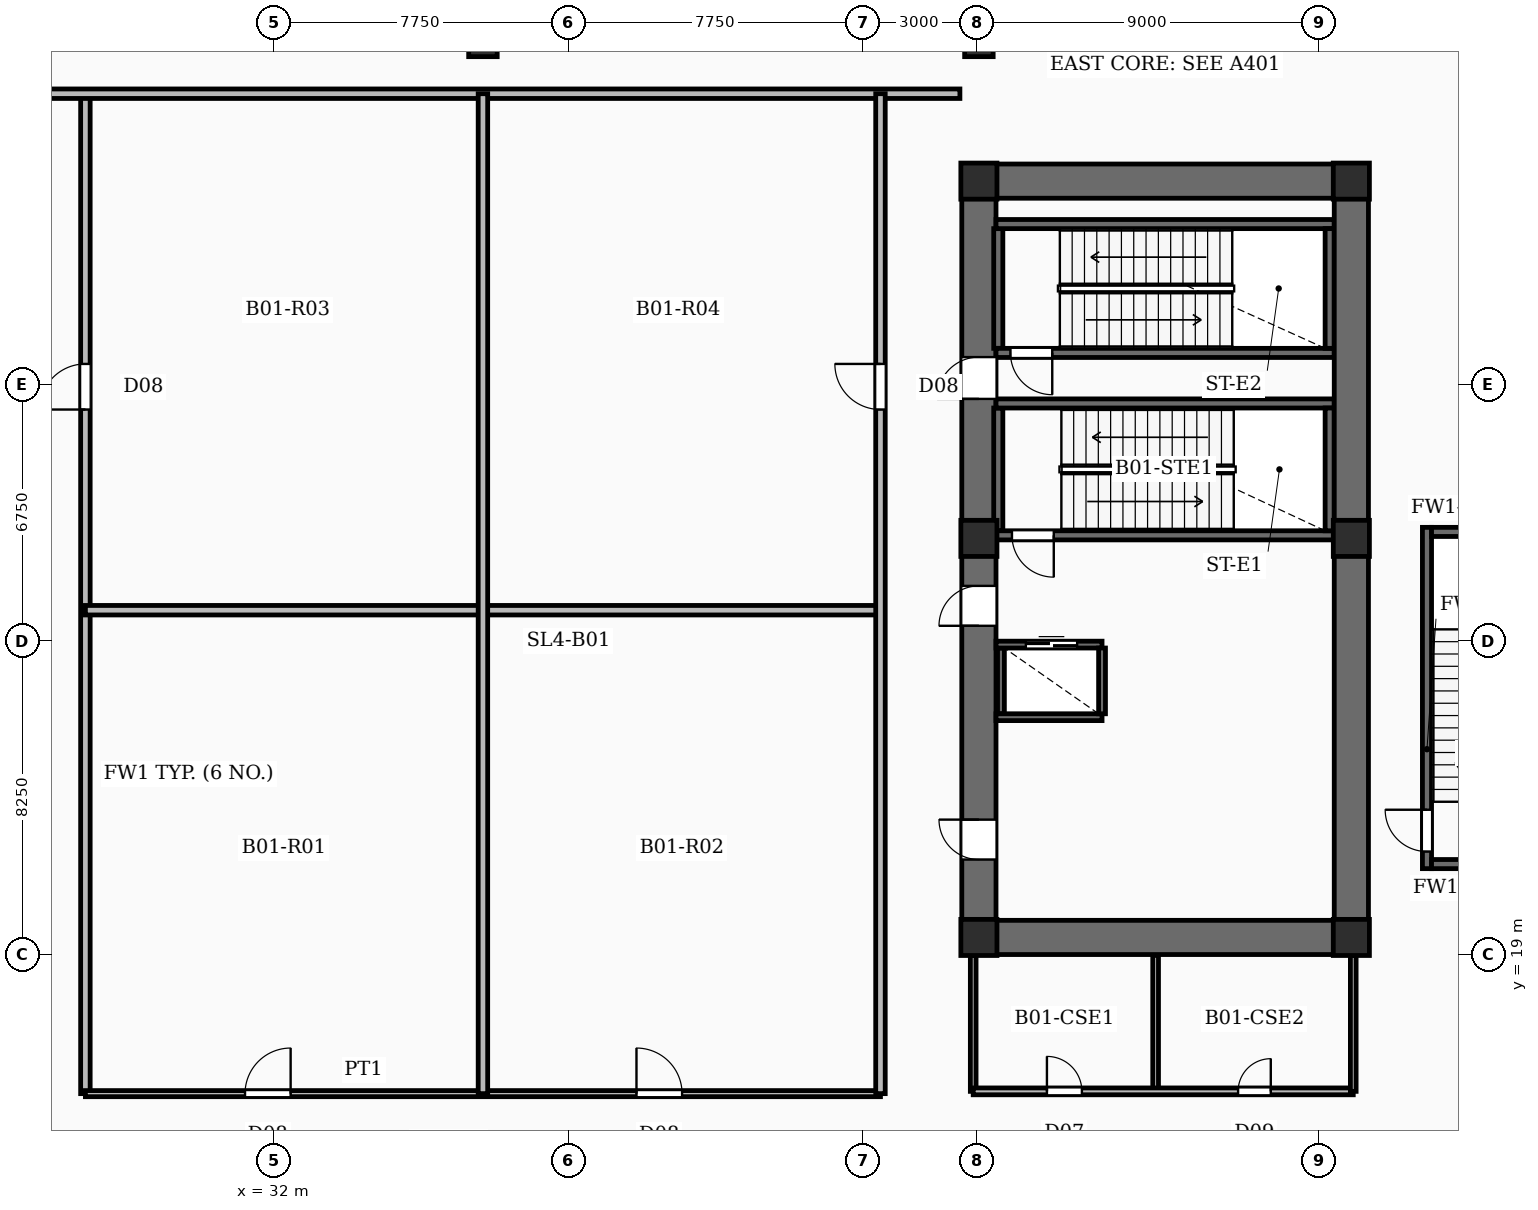
"""IFC4 building model, lengths in metres.
Left out: names, types, materials, properties, quantities, classifications, styles, units other than length and angle.
Written with IfcOpenShell. Run it as: python <this file> out.ifc"""

import sys

from ifc_helpers import new_model, si_unit, direction, frame, frame_2d, origin, origin_2d, place, context, subcontext, project, spatial, rectangle, extrude, element, fill, save


model = new_model("IFC4")
c1 = context("Model", 3, precision=1e-05, world=origin(), true_north=direction((0.0, 1.0)))
c2 = subcontext(c1, "Body", "Model", "MODEL_VIEW")
j1 = project(units=[si_unit("LENGTHUNIT", "METRE"), si_unit("PLANEANGLEUNIT", "RADIAN")], contexts=[c1])
p1 = place(None, origin())
s1 = spatial("IfcSite", under=j1, at=p1, CompositionType="ELEMENT")
p2 = place(p1, origin())
s2 = spatial("IfcBuilding", under=s1, at=p2, CompositionType="ELEMENT")
p3 = place(p2, frame((0.0, 0.0, -5.0)))
s3 = spatial("IfcBuildingStorey", under=s2, at=p3, CompositionType="ELEMENT", Elevation=-5.0)
p4 = place(p3, frame((50.55, 19.0, -0.31), z_axis=(0.0, 0.0, 1.0), x_axis=(0.0, 1.0, 0.0)))
e1 = element("IfcWall", 1, at=p4, inside=s3, PredefinedType="SHEAR", context=c2, shape_type="SweptSolid", body=[
    extrude(rectangle(XDim=20.8, YDim=0.9, at=frame_2d((10.4, 0.0))), origin(), (0.0, 0.0, 1.0), 4.86),
])
p5 = place(p4, frame((2.5, 0.0, 0.31)))
e2 = element("IfcOpeningElement", 2, at=p5, cuts=e1, PredefinedType="OPENING", context=c2, shape_type="SweptSolid", body=[
    extrude(rectangle(XDim=1.05, YDim=2.15, at=frame_2d((0.525, 1.075))), frame((0.0, 0.46, 0.0), z_axis=(0.0, -1.0, 0.0), x_axis=(1.0, 0.0, 0.0)), (0.0, 0.0, 1.0), 0.92),
])
p6 = place(p4, frame((8.65, 0.0, 0.31)))
e3 = element("IfcOpeningElement", 3, at=p6, cuts=e1, PredefinedType="OPENING", context=c2, shape_type="SweptSolid", body=[
    extrude(rectangle(XDim=1.05, YDim=2.15, at=frame_2d((0.525, 1.075))), frame((0.0, 0.46, 0.0), z_axis=(0.0, -1.0, 0.0), x_axis=(1.0, 0.0, 0.0)), (0.0, 0.0, 1.0), 0.92),
])
p7 = place(p4, frame((14.62, 0.0, 0.31)))
e4 = element("IfcOpeningElement", 4, at=p7, cuts=e1, PredefinedType="OPENING", context=c2, shape_type="SweptSolid", body=[
    extrude(rectangle(XDim=1.1, YDim=2.15, at=frame_2d((0.55, 1.075))), frame((0.0, 0.46, 0.0), z_axis=(0.0, -1.0, 0.0), x_axis=(1.0, 0.0, 0.0)), (0.0, 0.0, 1.0), 0.92),
])
p8 = place(p3, frame((60.35, 19.0, -0.31), z_axis=(0.0, 0.0, 1.0), x_axis=(0.0, 1.0, 0.0)))
e5 = element("IfcWall", 5, at=p8, inside=s3, PredefinedType="SHEAR", context=c2, shape_type="SweptSolid", body=[
    extrude(rectangle(XDim=20.8, YDim=0.9, at=frame_2d((10.4, 0.0))), origin(), (0.0, 0.0, 1.0), 4.86),
])
for number, where, z_axis, x_axis in (
    (6, (51.0, 19.45, -0.31), (0.0, 0.0, 1.0), (1.0, 0.0, 0.0)),
    (7, (51.0, 39.35, -0.31), (0.0, 0.0, 1.0), (1.0, 0.0, 0.0)),
):
    element("IfcWall", number, at=place(p3, frame(where, z_axis=z_axis, x_axis=x_axis)), inside=s3, PredefinedType="SHEAR", context=c2, shape_type="SweptSolid", body=[
        extrude(rectangle(XDim=8.9, YDim=0.9, at=frame_2d((4.45, 0.0))), origin(), (0.0, 0.0, 1.0), 4.86),
    ])
for number, where, z_axis, x_axis in (
    (8, (50.55, 19.45, -0.31), (0.0, 0.0, 1.0), (1.0, 0.0, 0.0)),
    (9, (60.35, 19.45, -0.31), (0.0, 0.0, 1.0), (1.0, 0.0, 0.0)),
    (10, (50.55, 29.95, -0.31), (0.0, 0.0, 1.0), (1.0, 0.0, 0.0)),
    (11, (60.35, 29.95, -0.31), (0.0, 0.0, 1.0), (1.0, 0.0, 0.0)),
    (12, (50.55, 39.35, -0.31), (0.0, 0.0, 1.0), (1.0, 0.0, 0.0)),
    (13, (60.35, 39.35, -0.31), (0.0, 0.0, 1.0), (1.0, 0.0, 0.0)),
):
    element("IfcColumn", number, at=place(p3, frame(where, z_axis=z_axis, x_axis=x_axis)), inside=s3, PredefinedType="COLUMN", context=c2, shape_type="SweptSolid", body=[
        extrude(rectangle(XDim=0.95, YDim=0.95, at=origin_2d()), origin(), (0.0, 0.0, 1.0), 4.86),
    ])
for number, where, z_axis, x_axis in (
    (14, (37.5, 43.0, -0.31), (0.0, 0.0, 1.0), (1.0, 0.0, 0.0)),
    (15, (50.55, 43.0, -0.31), (0.0, 0.0, 1.0), (1.0, 0.0, 0.0)),
):
    element("IfcColumn", number, at=place(p3, frame(where, z_axis=z_axis, x_axis=x_axis)), inside=s3, PredefinedType="COLUMN", context=c2, shape_type="SweptSolid", body=[
        extrude(rectangle(XDim=0.75, YDim=0.75, at=origin_2d()), origin(), (0.0, 0.0, 1.0), 4.86),
    ])
p9 = place(p3, frame((62.34, 21.26, 0.0), z_axis=(0.0, 0.0, 1.0), x_axis=(0.0, 1.0, 0.0)))
e16 = element("IfcWall", 16, at=p9, inside=s3, PredefinedType="SOLIDWALL", context=c2, shape_type="SweptSolid", body=[
    extrude(rectangle(XDim=8.98, YDim=0.24, at=frame_2d((4.49, 0.0))), origin(), (0.0, 0.0, 1.0), 4.55),
])
p10 = place(p9, frame((0.45, 0.0, 0.0)))
e17 = element("IfcOpeningElement", 17, at=p10, cuts=e16, PredefinedType="OPENING", context=c2, shape_type="SweptSolid", body=[
    extrude(rectangle(XDim=1.1, YDim=2.15, at=frame_2d((0.55, 1.075))), frame((0.0, 0.13, 0.0), z_axis=(0.0, -1.0, 0.0), x_axis=(1.0, 0.0, 0.0)), (0.0, 0.0, 1.0), 0.26),
])
for number, where, z_axis, x_axis in (
    (18, (62.46, 21.38, 0.0), (0.0, 0.0, 1.0), (1.0, 0.0, 0.0)),
    (19, (62.46, 30.12, 0.0), (0.0, 0.0, 1.0), (1.0, 0.0, 0.0)),
):
    element("IfcWall", number, at=place(p3, frame(where, z_axis=z_axis, x_axis=x_axis)), inside=s3, PredefinedType="SOLIDWALL", context=c2, shape_type="SweptSolid", body=[
        extrude(rectangle(XDim=3.19, YDim=0.24, at=frame_2d((1.595, 0.0))), origin(), (0.0, 0.0, 1.0), 4.55),
    ])
p11 = place(p3, frame((59.9, 30.03, 0.0), z_axis=(0.0, 0.0, 1.0), x_axis=(-1.0, 0.0, 0.0)))
e20 = element("IfcWall", 20, at=p11, inside=s3, PredefinedType="SOLIDWALL", context=c2, shape_type="SweptSolid", body=[
    extrude(rectangle(XDim=8.9, YDim=0.24, at=frame_2d((4.45, 0.0))), origin(), (0.0, 0.0, 1.0), 4.55),
])
p12 = place(p11, frame((7.38, 0.0, 0.0)))
e21 = element("IfcOpeningElement", 21, at=p12, cuts=e20, PredefinedType="OPENING", context=c2, shape_type="SweptSolid", body=[
    extrude(rectangle(XDim=1.1, YDim=2.15, at=frame_2d((0.55, 1.075))), frame((0.0, 0.13, 0.0), z_axis=(0.0, -1.0, 0.0), x_axis=(1.0, 0.0, 0.0)), (0.0, 0.0, 1.0), 0.26),
])
p13 = place(p3, frame((51.0, 33.5, 0.0), z_axis=(0.0, 0.0, 1.0), x_axis=(1.0, 0.0, 0.0)))
e22 = element("IfcWall", 22, at=p13, inside=s3, PredefinedType="SOLIDWALL", context=c2, shape_type="SweptSolid", body=[
    extrude(rectangle(XDim=8.9, YDim=0.24, at=frame_2d((4.45, 0.0))), origin(), (0.0, 0.0, 1.0), 4.55),
])
for number, where, z_axis, x_axis in (
    (23, (51.06, 30.15, 0.0), (0.0, 0.0, 1.0), (0.0, 1.0, 0.0)),
    (24, (59.78, 30.15, 0.0), (0.0, 0.0, 1.0), (0.0, 1.0, 0.0)),
):
    element("IfcWall", number, at=place(p3, frame(where, z_axis=z_axis, x_axis=x_axis)), inside=s3, PredefinedType="SOLIDWALL", context=c2, shape_type="SweptSolid", body=[
        extrude(rectangle(XDim=3.23, YDim=0.24, at=frame_2d((1.615, 0.0))), origin(), (0.0, 0.0, 1.0), 4.55),
    ])
p14 = place(p3, frame((59.9, 34.83, 0.0), z_axis=(0.0, 0.0, 1.0), x_axis=(-1.0, 0.0, 0.0)))
e25 = element("IfcWall", 25, at=p14, inside=s3, PredefinedType="SOLIDWALL", context=c2, shape_type="SweptSolid", body=[
    extrude(rectangle(XDim=8.9, YDim=0.24, at=frame_2d((4.45, 0.0))), origin(), (0.0, 0.0, 1.0), 4.55),
])
p15 = place(p14, frame((7.42, 0.0, 0.0)))
e26 = element("IfcOpeningElement", 26, at=p15, cuts=e25, PredefinedType="OPENING", context=c2, shape_type="SweptSolid", body=[
    extrude(rectangle(XDim=1.1, YDim=2.15, at=frame_2d((0.55, 1.075))), frame((0.0, 0.13, 0.0), z_axis=(0.0, -1.0, 0.0), x_axis=(1.0, 0.0, 0.0)), (0.0, 0.0, 1.0), 0.26),
])
p16 = place(p3, frame((51.0, 38.22, 0.0), z_axis=(0.0, 0.0, 1.0), x_axis=(1.0, 0.0, 0.0)))
e27 = element("IfcWall", 27, at=p16, inside=s3, PredefinedType="SOLIDWALL", context=c2, shape_type="SweptSolid", body=[
    extrude(rectangle(XDim=8.9, YDim=0.24, at=frame_2d((4.45, 0.0))), origin(), (0.0, 0.0, 1.0), 4.55),
])
for number, where, z_axis, x_axis in (
    (28, (51.06, 34.95, 0.0), (0.0, 0.0, 1.0), (0.0, 1.0, 0.0)),
    (29, (59.78, 34.95, 0.0), (0.0, 0.0, 1.0), (0.0, 1.0, 0.0)),
):
    element("IfcWall", number, at=place(p3, frame(where, z_axis=z_axis, x_axis=x_axis)), inside=s3, PredefinedType="SOLIDWALL", context=c2, shape_type="SweptSolid", body=[
        extrude(rectangle(XDim=3.15, YDim=0.24, at=frame_2d((1.575, 0.0))), origin(), (0.0, 0.0, 1.0), 4.55),
    ])
p17 = place(p3, frame((51.0, 27.155, 0.0), z_axis=(0.0, 0.0, 1.0), x_axis=(1.0, 0.0, 0.0)))
e30 = element("IfcWall", 30, at=p17, inside=s3, PredefinedType="SOLIDWALL", context=c2, shape_type="SweptSolid", body=[
    extrude(rectangle(XDim=2.79, YDim=0.18, at=frame_2d((1.395, 0.0))), origin(), (0.0, 0.0, 1.0), 4.55),
])
p18 = place(p17, frame((0.785, 0.0, 0.0)))
e31 = element("IfcOpeningElement", 31, at=p18, cuts=e30, PredefinedType="OPENING", context=c2, shape_type="SweptSolid", body=[
    extrude(rectangle(XDim=1.35, YDim=2.3, at=frame_2d((0.675, 1.15))), frame((0.0, 0.1, 0.0), z_axis=(0.0, -1.0, 0.0), x_axis=(1.0, 0.0, 0.0)), (0.0, 0.0, 1.0), 0.2),
])
p19 = place(p3, frame((51.0, 25.245, 0.0), z_axis=(0.0, 0.0, 1.0), x_axis=(1.0, 0.0, 0.0)))
e32 = element("IfcWall", 32, at=p19, inside=s3, PredefinedType="SOLIDWALL", context=c2, shape_type="SweptSolid", body=[
    extrude(rectangle(XDim=2.79, YDim=0.18, at=frame_2d((1.395, 0.0))), origin(), (0.0, 0.0, 1.0), 4.55),
])
for number, where, z_axis, x_axis in (
    (33, (51.13, 25.335, 0.0), (0.0, 0.0, 1.0), (0.0, 1.0, 0.0)),
    (34, (53.79, 25.335, 0.0), (0.0, 0.0, 1.0), (0.0, 1.0, 0.0)),
):
    element("IfcWall", number, at=place(p3, frame(where, z_axis=z_axis, x_axis=x_axis)), inside=s3, PredefinedType="SOLIDWALL", context=c2, shape_type="SweptSolid", body=[
        extrude(rectangle(XDim=1.73, YDim=0.18, at=frame_2d((0.865, 0.0))), origin(), (0.0, 0.0, 1.0), 4.55),
    ])
p20 = place(p3, frame((55.2, 15.4, 0.0), z_axis=(0.0, 0.0, 1.0), x_axis=(0.0, 1.0, 0.0)))
e35 = element("IfcWall", 35, at=p20, inside=s3, PredefinedType="PARTITIONING", context=c2, shape_type="SweptSolid", body=[
    extrude(rectangle(XDim=3.58, YDim=0.15, at=frame_2d((1.79, 0.0))), origin(), (0.0, 0.0, 1.0), 3.61),
])
p21 = place(p3, frame((50.4, 15.4, 0.0), z_axis=(0.0, 0.0, 1.0), x_axis=(1.0, 0.0, 0.0)))
e36 = element("IfcWall", 36, at=p21, inside=s3, PredefinedType="SOLIDWALL", context=c2, shape_type="SweptSolid", body=[
    extrude(rectangle(XDim=10.0, YDim=0.18, at=frame_2d((5.0, 0.0))), origin(), (0.0, 0.0, 1.0), 3.61),
])
p22 = place(p21, frame((1.94, 0.0, 0.0)))
e37 = element("IfcOpeningElement", 37, at=p22, cuts=e36, PredefinedType="OPENING", context=c2, shape_type="SweptSolid", body=[
    extrude(rectangle(XDim=0.92, YDim=2.1, at=frame_2d((0.46, 1.05))), frame((0.0, 0.1, 0.0), z_axis=(0.0, -1.0, 0.0), x_axis=(1.0, 0.0, 0.0)), (0.0, 0.0, 1.0), 0.2),
])
p23 = place(p21, frame((6.97, 0.0, 0.0)))
e38 = element("IfcOpeningElement", 38, at=p23, cuts=e36, PredefinedType="OPENING", context=c2, shape_type="SweptSolid", body=[
    extrude(rectangle(XDim=0.86, YDim=2.05, at=frame_2d((0.43, 1.025))), frame((0.0, 0.1, 0.0), z_axis=(0.0, -1.0, 0.0), x_axis=(1.0, 0.0, 0.0)), (0.0, 0.0, 1.0), 0.2),
])
for number, where, z_axis, x_axis in (
    (39, (50.4, 15.4, 0.0), (0.0, 0.0, 1.0), (0.0, 1.0, 0.0)),
    (40, (60.4, 15.4, 0.0), (0.0, 0.0, 1.0), (0.0, 1.0, 0.0)),
):
    element("IfcWall", number, at=place(p3, frame(where, z_axis=z_axis, x_axis=x_axis)), inside=s3, PredefinedType="PARTITIONING", context=c2, shape_type="SweptSolid", body=[
        extrude(rectangle(XDim=3.58, YDim=0.15, at=frame_2d((1.79, 0.0))), origin(), (0.0, 0.0, 1.0), 3.61),
    ])
p24 = place(p3, frame((27.04, 15.34, 0.0), z_axis=(0.0, 0.0, 1.0), x_axis=(1.0, 0.0, 0.0)))
e41 = element("IfcWall", 41, at=p24, inside=s3, PredefinedType="PARTITIONING", context=c2, shape_type="SweptSolid", body=[
    extrude(rectangle(XDim=20.92, YDim=0.16, at=frame_2d((10.46, 0.0))), origin(), (0.0, 0.0, 1.0), 3.61),
])
p25 = place(p24, frame((4.2, 0.0, 0.0)))
e42 = element("IfcOpeningElement", 42, at=p25, cuts=e41, PredefinedType="OPENING", context=c2, shape_type="SweptSolid", body=[
    extrude(rectangle(XDim=1.2, YDim=2.2, at=frame_2d((0.6, 1.1))), frame((0.0, 0.09, 0.0), z_axis=(0.0, -1.0, 0.0), x_axis=(1.0, 0.0, 0.0)), (0.0, 0.0, 1.0), 0.18),
])
p26 = place(p24, frame((14.5, 0.0, 0.0)))
e43 = element("IfcOpeningElement", 43, at=p26, cuts=e41, PredefinedType="OPENING", context=c2, shape_type="SweptSolid", body=[
    extrude(rectangle(XDim=1.2, YDim=2.2, at=frame_2d((0.6, 1.1))), frame((0.0, 0.09, 0.0), z_axis=(0.0, -1.0, 0.0), x_axis=(1.0, 0.0, 0.0)), (0.0, 0.0, 1.0), 0.18),
])
p27 = place(p3, frame((37.5, 15.34, 0.0), z_axis=(0.0, 0.0, 1.0), x_axis=(0.0, 1.0, 0.0)))
e44 = element("IfcWall", 44, at=p27, inside=s3, PredefinedType="SOLIDWALL", context=c2, shape_type="SweptSolid", body=[
    extrude(rectangle(XDim=26.31, YDim=0.25, at=frame_2d((13.155, 0.0))), origin(), (0.0, 0.0, 1.0), 3.61),
])
p28 = place(p3, frame((27.04, 28.06, 0.0), z_axis=(0.0, 0.0, 1.0), x_axis=(1.0, 0.0, 0.0)))
e45 = element("IfcWall", 45, at=p28, inside=s3, PredefinedType="SOLIDWALL", context=c2, shape_type="SweptSolid", body=[
    extrude(rectangle(XDim=20.92, YDim=0.25, at=frame_2d((10.46, 0.0))), origin(), (0.0, 0.0, 1.0), 3.61),
])
p29 = place(p3, frame((24.85, 41.65, 0.0), z_axis=(0.0, 0.0, 1.0), x_axis=(1.0, 0.0, 0.0)))
e46 = element("IfcWall", 46, at=p29, inside=s3, PredefinedType="SOLIDWALL", context=c2, shape_type="SweptSolid", body=[
    extrude(rectangle(XDim=25.2, YDim=0.25, at=frame_2d((12.6, 0.0))), origin(), (0.0, 0.0, 1.0), 3.61),
])
p30 = place(p3, frame((27.04, 15.34, 0.0), z_axis=(0.0, 0.0, 1.0), x_axis=(0.0, 1.0, 0.0)))
e47 = element("IfcWall", 47, at=p30, inside=s3, PredefinedType="SOLIDWALL", context=c2, shape_type="SweptSolid", body=[
    extrude(rectangle(XDim=26.31, YDim=0.25, at=frame_2d((13.155, 0.0))), origin(), (0.0, 0.0, 1.0), 3.61),
])
p31 = place(p30, frame((18.0, 0.0, 0.0)))
e48 = element("IfcOpeningElement", 48, at=p31, cuts=e47, PredefinedType="OPENING", context=c2, shape_type="SweptSolid", body=[
    extrude(rectangle(XDim=1.2, YDim=2.2, at=frame_2d((0.6, 1.1))), frame((0.0, 0.135, 0.0), z_axis=(0.0, -1.0, 0.0), x_axis=(1.0, 0.0, 0.0)), (0.0, 0.0, 1.0), 0.27),
])
p32 = place(p3, frame((47.96, 15.34, 0.0), z_axis=(0.0, 0.0, 1.0), x_axis=(0.0, 1.0, 0.0)))
e49 = element("IfcWall", 49, at=p32, inside=s3, PredefinedType="SOLIDWALL", context=c2, shape_type="SweptSolid", body=[
    extrude(rectangle(XDim=26.31, YDim=0.25, at=frame_2d((13.155, 0.0))), origin(), (0.0, 0.0, 1.0), 3.61),
])
p33 = place(p32, frame((18.0, 0.0, 0.0)))
e50 = element("IfcOpeningElement", 50, at=p33, cuts=e49, PredefinedType="OPENING", context=c2, shape_type="SweptSolid", body=[
    extrude(rectangle(XDim=1.2, YDim=2.2, at=frame_2d((0.6, 1.1))), frame((0.0, 0.135, 0.0), z_axis=(0.0, -1.0, 0.0), x_axis=(1.0, 0.0, 0.0)), (0.0, 0.0, 1.0), 0.27),
])
p34 = place(p10, origin())
e51 = element("IfcDoor", 51, at=p34, inside=s3, OperationType="SINGLE_SWING_RIGHT", PredefinedType="DOOR", context=c2, shape_type="SweptSolid", body=[
    extrude(rectangle(XDim=1.1, YDim=2.15, at=frame_2d((0.55, 1.075))), frame((0.0, 0.025, 0.0), z_axis=(0.0, -1.0, 0.0), x_axis=(1.0, 0.0, 0.0)), (0.0, 0.0, 1.0), 0.05),
])
fill(e17, e51)
p35 = place(p5, origin())
e52 = element("IfcDoor", 52, at=p35, inside=s3, OperationType="SINGLE_SWING_RIGHT", PredefinedType="DOOR", context=c2, shape_type="SweptSolid", body=[
    extrude(rectangle(XDim=1.05, YDim=2.15, at=frame_2d((0.525, 1.075))), frame((0.0, 0.025, 0.0), z_axis=(0.0, -1.0, 0.0), x_axis=(1.0, 0.0, 0.0)), (0.0, 0.0, 1.0), 0.05),
])
fill(e2, e52)
p36 = place(p6, origin())
e53 = element("IfcDoor", 53, at=p36, inside=s3, OperationType="SINGLE_SWING_LEFT", PredefinedType="DOOR", context=c2, shape_type="SweptSolid", body=[
    extrude(rectangle(XDim=1.05, YDim=2.15, at=frame_2d((0.525, 1.075))), frame((0.0, 0.025, 0.0), z_axis=(0.0, -1.0, 0.0), x_axis=(1.0, 0.0, 0.0)), (0.0, 0.0, 1.0), 0.05),
])
fill(e3, e53)
p37 = place(p7, origin())
e54 = element("IfcDoor", 54, at=p37, inside=s3, OperationType="SINGLE_SWING_LEFT", PredefinedType="DOOR", context=c2, shape_type="SweptSolid", body=[
    extrude(rectangle(XDim=1.1, YDim=2.15, at=frame_2d((0.55, 1.075))), frame((0.0, 0.025, 0.0), z_axis=(0.0, -1.0, 0.0), x_axis=(1.0, 0.0, 0.0)), (0.0, 0.0, 1.0), 0.05),
])
fill(e4, e54)
p38 = place(p12, origin())
e55 = element("IfcDoor", 55, at=p38, inside=s3, OperationType="SINGLE_SWING_LEFT", PredefinedType="DOOR", context=c2, shape_type="SweptSolid", body=[
    extrude(rectangle(XDim=1.1, YDim=2.15, at=frame_2d((0.55, 1.075))), frame((0.0, 0.025, 0.0), z_axis=(0.0, -1.0, 0.0), x_axis=(1.0, 0.0, 0.0)), (0.0, 0.0, 1.0), 0.05),
])
fill(e21, e55)
p39 = place(p15, origin())
e56 = element("IfcDoor", 56, at=p39, inside=s3, OperationType="SINGLE_SWING_LEFT", PredefinedType="DOOR", context=c2, shape_type="SweptSolid", body=[
    extrude(rectangle(XDim=1.1, YDim=2.15, at=frame_2d((0.55, 1.075))), frame((0.0, 0.025, 0.0), z_axis=(0.0, -1.0, 0.0), x_axis=(1.0, 0.0, 0.0)), (0.0, 0.0, 1.0), 0.05),
])
fill(e26, e56)
p40 = place(p18, origin())
e57 = element("IfcDoor", 57, at=p40, inside=s3, OperationType="DOUBLE_DOOR_SLIDING", PredefinedType="DOOR", context=c2, shape_type="SweptSolid", body=[
    extrude(rectangle(XDim=1.35, YDim=2.3, at=frame_2d((0.675, 1.15))), frame((0.0, 0.025, 0.0), z_axis=(0.0, -1.0, 0.0), x_axis=(1.0, 0.0, 0.0)), (0.0, 0.0, 1.0), 0.05),
])
fill(e31, e57)
p41 = place(p22, origin())
e58 = element("IfcDoor", 58, at=p41, inside=s3, OperationType="SINGLE_SWING_LEFT", PredefinedType="DOOR", context=c2, shape_type="SweptSolid", body=[
    extrude(rectangle(XDim=0.92, YDim=2.1, at=frame_2d((0.46, 1.05))), frame((0.0, 0.025, 0.0), z_axis=(0.0, -1.0, 0.0), x_axis=(1.0, 0.0, 0.0)), (0.0, 0.0, 1.0), 0.05),
])
fill(e37, e58)
p42 = place(p23, origin())
e59 = element("IfcDoor", 59, at=p42, inside=s3, OperationType="SINGLE_SWING_RIGHT", PredefinedType="DOOR", context=c2, shape_type="SweptSolid", body=[
    extrude(rectangle(XDim=0.86, YDim=2.05, at=frame_2d((0.43, 1.025))), frame((0.0, 0.025, 0.0), z_axis=(0.0, -1.0, 0.0), x_axis=(1.0, 0.0, 0.0)), (0.0, 0.0, 1.0), 0.05),
])
fill(e38, e59)
p43 = place(p25, origin())
e60 = element("IfcDoor", 60, at=p43, inside=s3, OperationType="SINGLE_SWING_RIGHT", PredefinedType="DOOR", context=c2, shape_type="SweptSolid", body=[
    extrude(rectangle(XDim=1.2, YDim=2.2, at=frame_2d((0.6, 1.1))), frame((0.0, 0.025, 0.0), z_axis=(0.0, -1.0, 0.0), x_axis=(1.0, 0.0, 0.0)), (0.0, 0.0, 1.0), 0.05),
])
fill(e42, e60)
p44 = place(p26, origin())
e61 = element("IfcDoor", 61, at=p44, inside=s3, OperationType="SINGLE_SWING_LEFT", PredefinedType="DOOR", context=c2, shape_type="SweptSolid", body=[
    extrude(rectangle(XDim=1.2, YDim=2.2, at=frame_2d((0.6, 1.1))), frame((0.0, 0.025, 0.0), z_axis=(0.0, -1.0, 0.0), x_axis=(1.0, 0.0, 0.0)), (0.0, 0.0, 1.0), 0.05),
])
fill(e43, e61)
p45 = place(p31, origin())
e62 = element("IfcDoor", 62, at=p45, inside=s3, OperationType="SINGLE_SWING_LEFT", PredefinedType="DOOR", context=c2, shape_type="SweptSolid", body=[
    extrude(rectangle(XDim=1.2, YDim=2.2, at=frame_2d((0.6, 1.1))), frame((0.0, 0.025, 0.0), z_axis=(0.0, -1.0, 0.0), x_axis=(1.0, 0.0, 0.0)), (0.0, 0.0, 1.0), 0.05),
])
fill(e48, e62)
p46 = place(p33, origin())
e63 = element("IfcDoor", 63, at=p46, inside=s3, OperationType="SINGLE_SWING_RIGHT", PredefinedType="DOOR", context=c2, shape_type="SweptSolid", body=[
    extrude(rectangle(XDim=1.2, YDim=2.2, at=frame_2d((0.6, 1.1))), frame((0.0, 0.025, 0.0), z_axis=(0.0, -1.0, 0.0), x_axis=(1.0, 0.0, 0.0)), (0.0, 0.0, 1.0), 0.05),
])
fill(e50, e63)
save(model, sys.argv[1])
